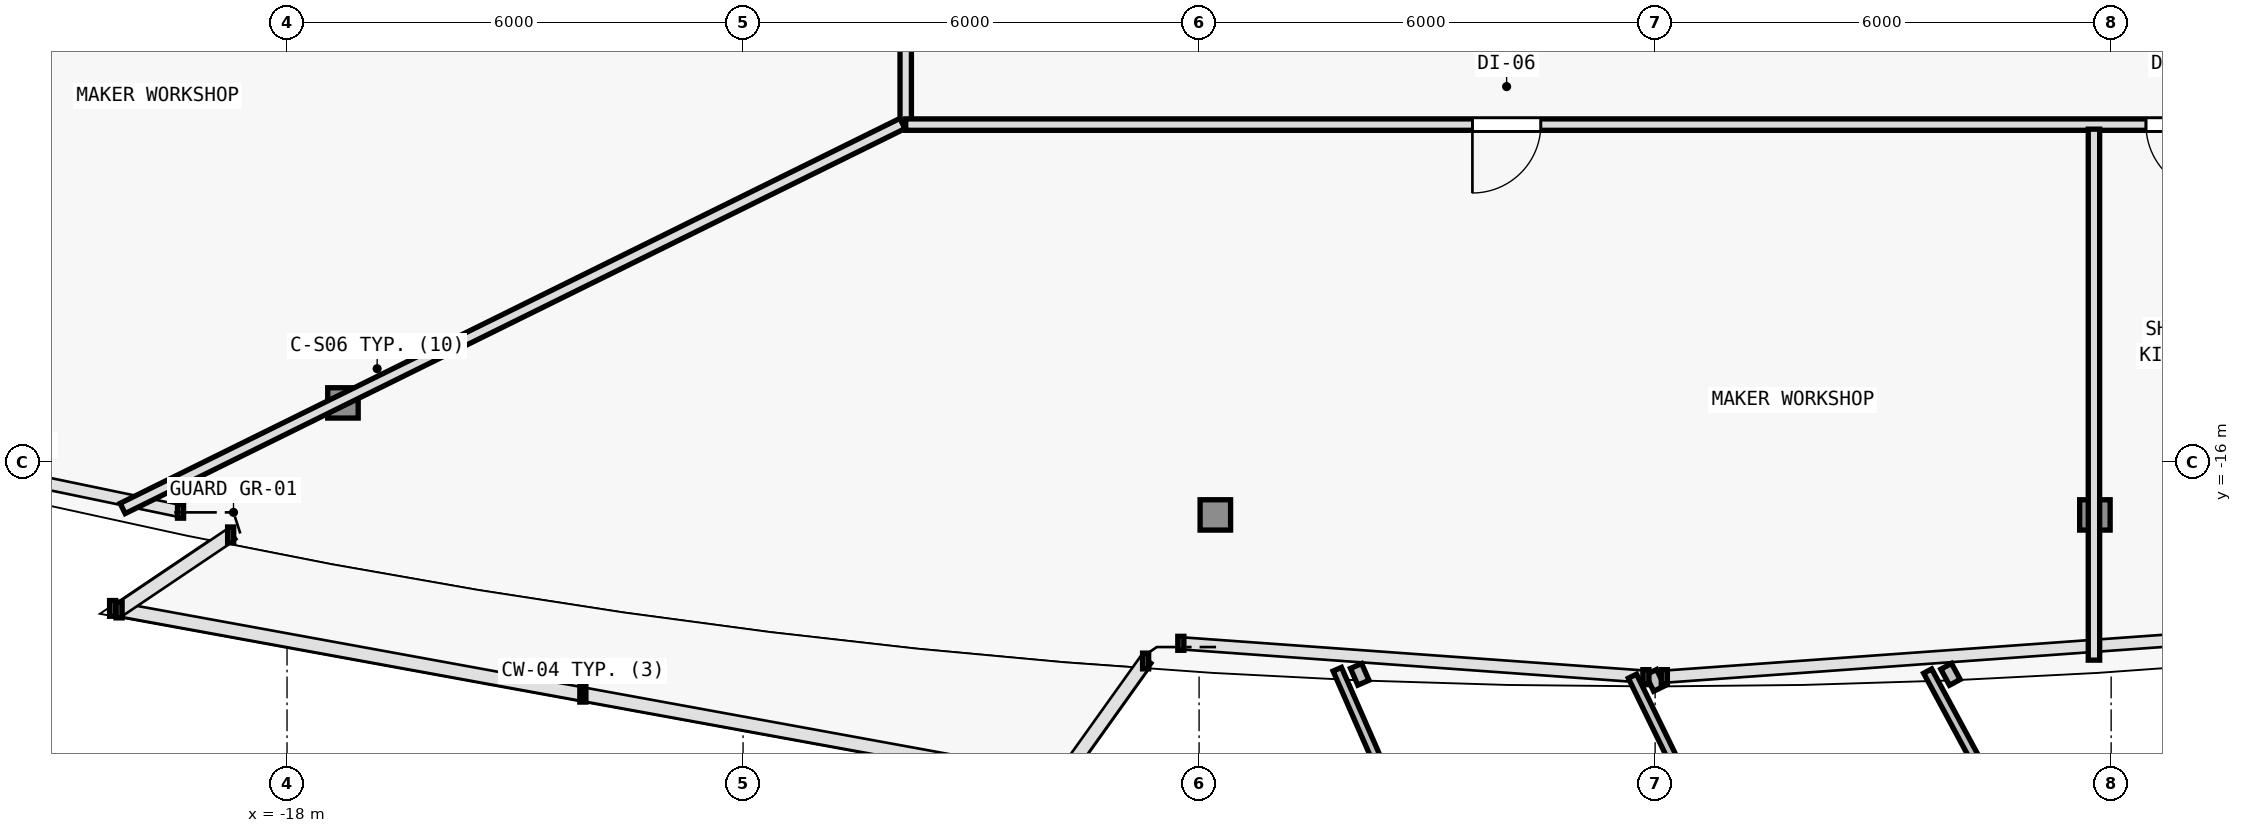
"""IFC4 building model, lengths in metres.
Left out: names, types, materials, properties, quantities, classifications, styles, units other than length and angle.
Written with IfcOpenShell. Run it as: python <this file> out.ifc"""

import sys

from ifc_helpers import new_model, si_unit, direction, frame, frame_2d, origin, origin_2d, place, context, subcontext, project, spatial, rectangle, i_section, extrude, element, fill, save


model = new_model("IFC4")
c1 = context("Model", 3, precision=1e-05, world=origin(), true_north=direction((0.0, 1.0)))
c2 = subcontext(c1, "Body", "Model", "MODEL_VIEW")
j1 = project(units=[si_unit("LENGTHUNIT", "METRE"), si_unit("PLANEANGLEUNIT", "RADIAN")], contexts=[c1])
p1 = place(None, origin())
s1 = spatial("IfcSite", under=j1, at=p1, CompositionType="ELEMENT")
p2 = place(p1, origin())
s2 = spatial("IfcBuilding", under=s1, at=p2, CompositionType="ELEMENT")
p3 = place(p2, frame((0.0, 0.0, 181.8)))
s3 = spatial("IfcBuildingStorey", under=s2, at=p3, CompositionType="ELEMENT", Elevation=181.8)
p4 = place(p3, frame((-17.264, -15.221, 0.005), z_axis=(0.020662834962, 0.033509136961, 0.999224792022), x_axis=(-0.851183725565, 0.524867855115, 0.0)))
e1 = element("IfcColumn", 1, at=p4, inside=s3, PredefinedType="COLUMN", context=c2, shape_type="SweptSolid", body=[
    extrude(i_section(OverallWidth=0.401, OverallDepth=0.399, WebThickness=0.016, FlangeThickness=0.025, FilletRadius=0.015, at=origin_2d()), origin(), (0.0, 0.0, 1.0), 3.592),
])
for number, where, z_axis, x_axis in (
    (2, (-5.786, -16.695, 0.005), (0.007, 0.035, 0.999), (-0.982, 0.191, 0.0)),
    (3, (5.786, -16.695, 0.005), (-0.007, 0.035, 0.999), (-0.982, -0.191, 0.0)),
):
    element("IfcColumn", number, at=place(p3, frame(where, z_axis=z_axis, x_axis=x_axis)), inside=s3, PredefinedType="COLUMN", context=c2, shape_type="SweptSolid", body=[
        extrude(i_section(OverallWidth=0.401, OverallDepth=0.399, WebThickness=0.016, FlangeThickness=0.025, FilletRadius=0.015, at=origin_2d()), origin(), (0.0, 0.0, 1.0), 3.592),
    ])
p5 = place(p3, frame((-9.86, -11.56, 0.0), z_axis=(0.0, 0.0, 1.0), x_axis=(0.0, 1.0, 0.0)))
e4 = element("IfcWall", 4, at=p5, inside=s3, PredefinedType="PARTITIONING", context=c2, shape_type="SweptSolid", body=[
    extrude(rectangle(XDim=19.986, YDim=0.15, at=frame_2d((9.993, 0.0))), origin(), (0.0, 0.0, 1.0), 2.755),
])
p6 = place(p5, frame((9.026, 0.0, 0.0)))
e5 = element("IfcOpeningElement", 5, at=p6, cuts=e4, PredefinedType="OPENING", context=c2, shape_type="SweptSolid", body=[
    extrude(rectangle(XDim=0.9, YDim=2.1, at=frame_2d((0.45, 1.05))), frame((0.0, 0.085, 0.0), z_axis=(0.0, -1.0, 0.0), x_axis=(1.0, 0.0, 0.0)), (0.0, 0.0, 1.0), 0.17),
])
p7 = place(p5, frame((7.096, 0.0, 0.0)))
e6 = element("IfcOpeningElement", 6, at=p7, cuts=e4, PredefinedType="OPENING", context=c2, shape_type="SweptSolid", body=[
    extrude(rectangle(XDim=0.85, YDim=2.1, at=frame_2d((0.425, 1.05))), frame((0.0, 0.085, 0.0), z_axis=(0.0, -1.0, 0.0), x_axis=(1.0, 0.0, 0.0)), (0.0, 0.0, 1.0), 0.17),
])
p8 = place(p5, frame((5.416, 0.0, 0.0)))
e7 = element("IfcOpeningElement", 7, at=p8, cuts=e4, PredefinedType="OPENING", context=c2, shape_type="SweptSolid", body=[
    extrude(rectangle(XDim=0.85, YDim=2.1, at=frame_2d((0.425, 1.05))), frame((0.0, 0.085, 0.0), z_axis=(0.0, -1.0, 0.0), x_axis=(1.0, 0.0, 0.0)), (0.0, 0.0, 1.0), 0.17),
])
p9 = place(p5, frame((2.127, 0.0, 0.0)))
e8 = element("IfcOpeningElement", 8, at=p9, cuts=e4, PredefinedType="OPENING", context=c2, shape_type="SweptSolid", body=[
    extrude(rectangle(XDim=0.9, YDim=2.1, at=frame_2d((0.45, 1.05))), frame((0.0, 0.085, 0.0), z_axis=(0.0, -1.0, 0.0), x_axis=(1.0, 0.0, 0.0)), (0.0, 0.0, 1.0), 0.17),
])
p10 = place(p5, frame((13.855, 0.0, 0.0)))
e9 = element("IfcOpeningElement", 9, at=p10, cuts=e4, PredefinedType="OPENING", context=c2, shape_type="SweptSolid", body=[
    extrude(rectangle(XDim=0.85, YDim=2.1, at=frame_2d((0.425, 1.05))), frame((0.0, 0.085, 0.0), z_axis=(0.0, -1.0, 0.0), x_axis=(1.0, 0.0, 0.0)), (0.0, 0.0, 1.0), 0.17),
])
p11 = place(p5, frame((11.576, 0.0, 0.0)))
e10 = element("IfcOpeningElement", 10, at=p11, cuts=e4, PredefinedType="OPENING", context=c2, shape_type="SweptSolid", body=[
    extrude(rectangle(XDim=0.9, YDim=2.1, at=frame_2d((0.45, 1.05))), frame((0.0, 0.085, 0.0), z_axis=(0.0, -1.0, 0.0), x_axis=(1.0, 0.0, 0.0)), (0.0, 0.0, 1.0), 0.17),
])
p12 = place(p3, frame((13.18, -11.56, 0.0), z_axis=(0.0, 0.0, 1.0), x_axis=(-1.0, 0.0, 0.0)))
e11 = element("IfcWall", 11, at=p12, inside=s3, PredefinedType="PARTITIONING", context=c2, shape_type="SweptSolid", body=[
    extrude(rectangle(XDim=23.04, YDim=0.15, at=frame_2d((11.52, 0.0))), origin(), (0.0, 0.0, 1.0), 2.755),
])
p13 = place(p12, frame((14.684, 0.0, 0.0)))
e12 = element("IfcOpeningElement", 12, at=p13, cuts=e11, PredefinedType="OPENING", context=c2, shape_type="SweptSolid", body=[
    extrude(rectangle(XDim=0.9, YDim=2.1, at=frame_2d((0.45, 1.05))), frame((0.0, 0.085, 0.0), z_axis=(0.0, -1.0, 0.0), x_axis=(1.0, 0.0, 0.0)), (0.0, 0.0, 1.0), 0.17),
])
p14 = place(p12, frame((5.822, 0.0, 0.0)))
e13 = element("IfcOpeningElement", 13, at=p14, cuts=e11, PredefinedType="OPENING", context=c2, shape_type="SweptSolid", body=[
    extrude(rectangle(XDim=0.9, YDim=2.1, at=frame_2d((0.45, 1.05))), frame((0.0, 0.085, 0.0), z_axis=(0.0, -1.0, 0.0), x_axis=(1.0, 0.0, 0.0)), (0.0, 0.0, 1.0), 0.17),
])
p15 = place(p12, frame((3.331, 0.0, 0.0)))
e14 = element("IfcOpeningElement", 14, at=p15, cuts=e11, PredefinedType="OPENING", context=c2, shape_type="SweptSolid", body=[
    extrude(rectangle(XDim=0.9, YDim=2.1, at=frame_2d((0.45, 1.05))), frame((0.0, 0.085, 0.0), z_axis=(0.0, -1.0, 0.0), x_axis=(1.0, 0.0, 0.0)), (0.0, 0.0, 1.0), 0.17),
])
p16 = place(p12, frame((0.851, 0.0, 0.0)))
e15 = element("IfcOpeningElement", 15, at=p16, cuts=e11, PredefinedType="OPENING", context=c2, shape_type="SweptSolid", body=[
    extrude(rectangle(XDim=0.9, YDim=2.1, at=frame_2d((0.45, 1.05))), frame((0.0, 0.085, 0.0), z_axis=(0.0, -1.0, 0.0), x_axis=(1.0, 0.0, 0.0)), (0.0, 0.0, 1.0), 0.17),
])
p17 = place(p3, frame((-9.903, -11.546, 0.0), z_axis=(0.0, 0.0, 1.0), x_axis=(-0.896703019524, -0.442632686069, 0.0)))
e16 = element("IfcWall", 16, at=p17, inside=s3, PredefinedType="PARTITIONING", context=c2, shape_type="SweptSolid", body=[
    extrude(rectangle(XDim=11.441, YDim=0.15, at=frame_2d((5.721, 0.0))), origin(), (0.0, 0.0, 1.0), 2.755),
])
p18 = place(p3, frame((5.774, -11.62, 0.0), z_axis=(0.0, 0.0, 1.0), x_axis=(0.0, -1.0, 0.0)))
e17 = element("IfcWall", 17, at=p18, inside=s3, PredefinedType="PARTITIONING", context=c2, shape_type="SweptSolid", body=[
    extrude(rectangle(XDim=6.986, YDim=0.15, at=frame_2d((3.493, 0.0))), origin(), (0.0, 0.0, 1.0), 2.865),
])
p19 = place(p13, origin())
e18 = element("IfcDoor", 18, at=p19, inside=s3, OperationType="SINGLE_SWING_RIGHT", PredefinedType="DOOR", context=c2, shape_type="SweptSolid", body=[
    extrude(rectangle(XDim=0.9, YDim=2.1, at=frame_2d((0.45, 1.05))), frame((0.0, 0.025, 0.0), z_axis=(0.0, -1.0, 0.0), x_axis=(1.0, 0.0, 0.0)), (0.0, 0.0, 1.0), 0.05),
])
fill(e12, e18)
p20 = place(p14, origin())
e19 = element("IfcDoor", 19, at=p20, inside=s3, OperationType="SINGLE_SWING_LEFT", PredefinedType="DOOR", context=c2, shape_type="SweptSolid", body=[
    extrude(rectangle(XDim=0.9, YDim=2.1, at=frame_2d((0.45, 1.05))), frame((0.0, 0.025, 0.0), z_axis=(0.0, -1.0, 0.0), x_axis=(1.0, 0.0, 0.0)), (0.0, 0.0, 1.0), 0.05),
])
fill(e13, e19)
save(model, sys.argv[1])
